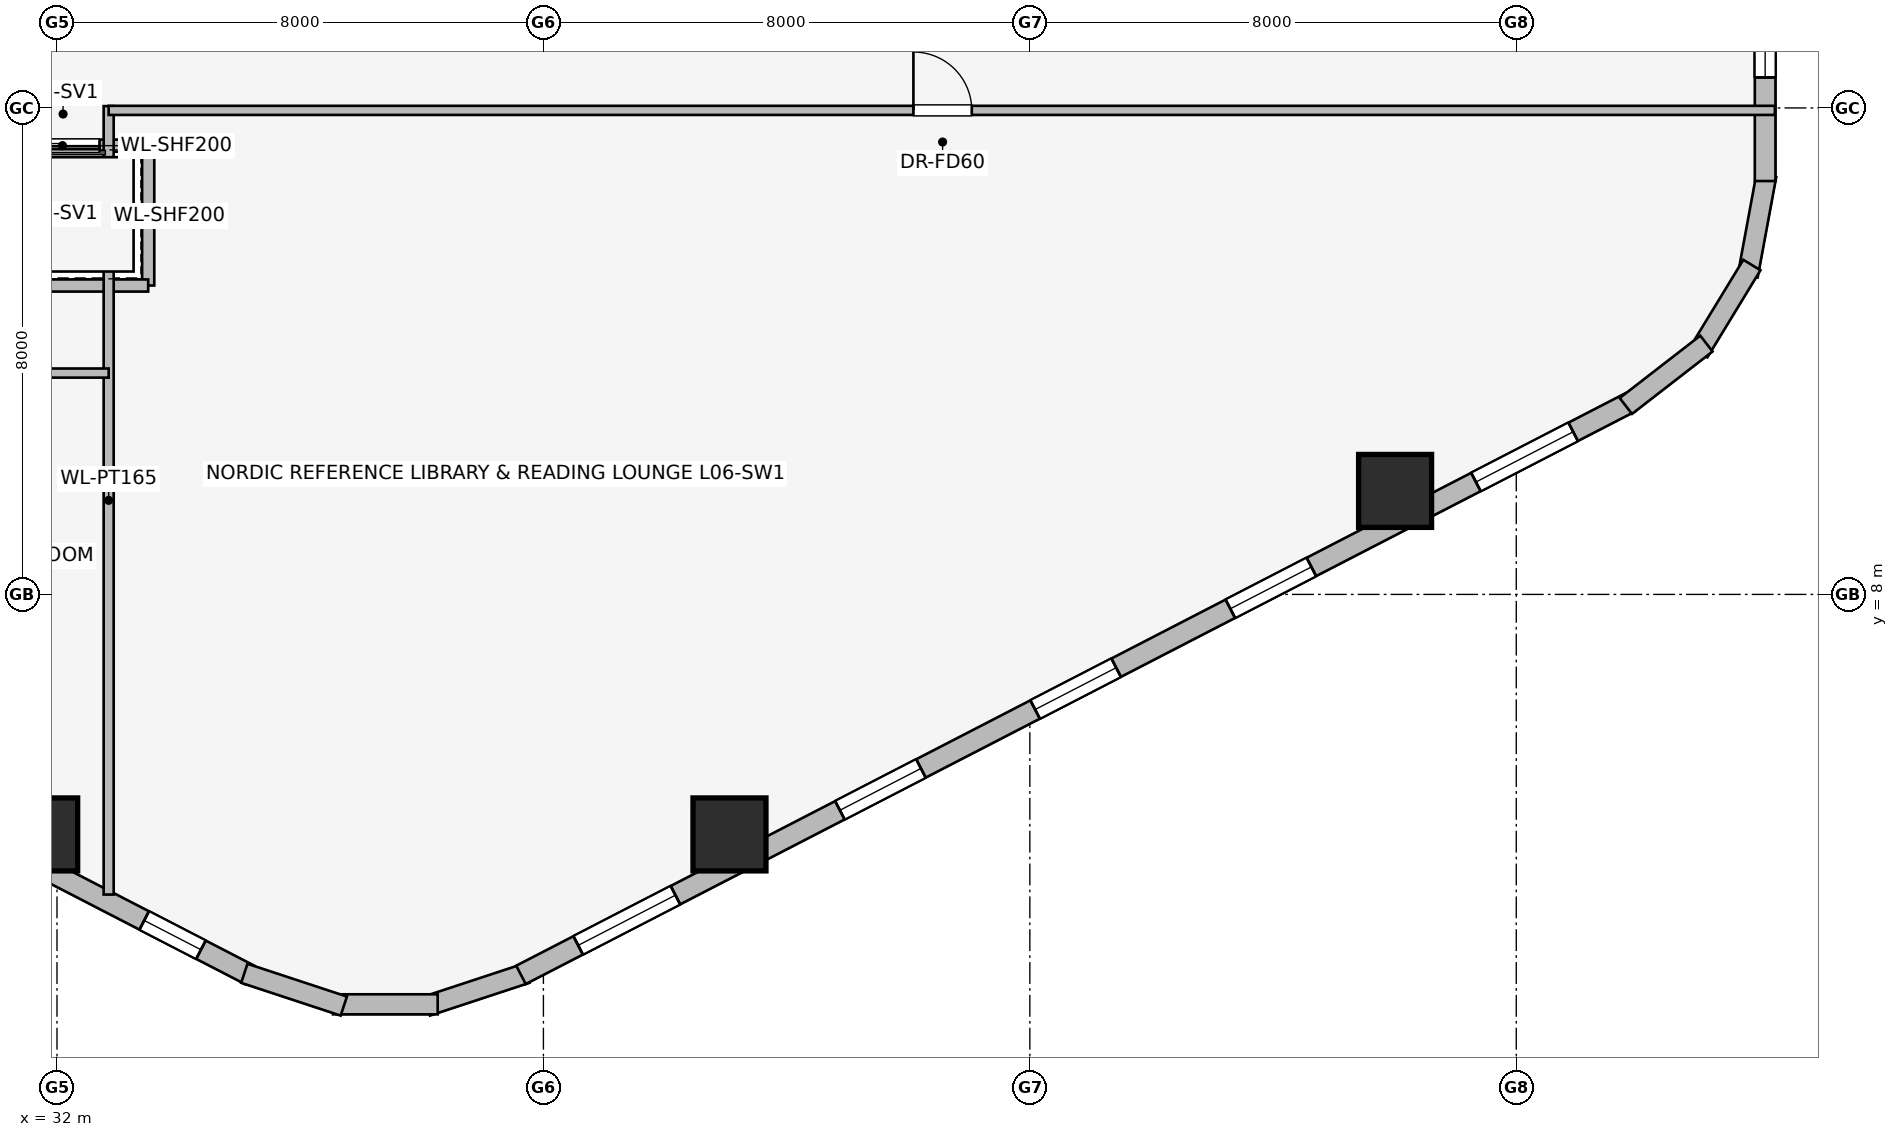
"""IFC4 building model, lengths in metres.
Left out: names, types, materials, properties, quantities, classifications, styles, units other than length and angle.
Written with IfcOpenShell. Run it as: python <this file> out.ifc"""

import sys

from ifc_helpers import new_model, si_unit, direction, frame, frame_2d, origin, origin_2d, place, context, subcontext, project, spatial, rectangle, hollow_rectangle, extrude, element, fill, save


model = new_model("IFC4")
c1 = context("Model", 3, precision=1e-05, world=origin(), true_north=direction((0.0, 1.0)))
c2 = subcontext(c1, "Body", "Model", "MODEL_VIEW")
j1 = project(units=[si_unit("LENGTHUNIT", "METRE"), si_unit("PLANEANGLEUNIT", "RADIAN")], contexts=[c1])
p1 = place(None, origin())
s1 = spatial("IfcSite", under=j1, at=p1, CompositionType="ELEMENT")
p2 = place(p1, origin())
s2 = spatial("IfcBuilding", under=s1, at=p2, CompositionType="ELEMENT")
p3 = place(p2, frame((0.0, 0.0, 21.0)))
s3 = spatial("IfcBuildingStorey", under=s2, at=p3, CompositionType="ELEMENT", Elevation=21.0)
for number, where, z_axis, x_axis in (
    (1, (36.0, 0.9, 5.55), (0.0, 0.0, 1.0), (1.0, 0.0, 0.0)),
    (2, (54.0, 0.9, 5.55), (0.0, 0.0, 1.0), (1.0, 0.0, 0.0)),
):
    element("IfcColumn", number, at=place(p3, frame(where, z_axis=z_axis, x_axis=x_axis)), inside=s3, PredefinedType="USERDEFINED", context=c2, shape_type="SweptSolid", body=[
        extrude(hollow_rectangle(XDim=0.4, YDim=0.4, WallThickness=0.022, at=origin_2d()), origin(), (0.0, 0.0, 1.0), 3.25),
    ])
p4 = place(p2, frame((0.0, 0.0, 27.0)))
s4 = spatial("IfcBuildingStorey", under=s2, at=p4, CompositionType="ELEMENT", Elevation=27.0)
for number, where, z_axis, x_axis in (
    (3, (31.74, 4.053, -0.42), (0.0, 0.0, 1.0), (1.0, 0.0, 0.0)),
    (4, (43.06, 4.053, -0.42), (0.0, 0.0, 1.0), (1.0, 0.0, 0.0)),
    (5, (54.007, 9.702, -0.42), (0.0, 0.0, 1.0), (1.0, 0.0, 0.0)),
):
    element("IfcColumn", number, at=place(p4, frame(where, z_axis=z_axis, x_axis=x_axis)), inside=s4, PredefinedType="COLUMN", context=c2, shape_type="SweptSolid", body=[
        extrude(rectangle(XDim=1.2, YDim=1.2, at=origin_2d()), origin(), (0.0, 0.0, 1.0), 4.07),
    ])
p5 = place(p4, frame((35.169, 1.743, 0.0), z_axis=(0.0, 0.0, 1.0), x_axis=(-0.888634413993, 0.458616264721, 0.0)))
e6 = element("IfcWall", 6, at=p5, inside=s4, PredefinedType="STANDARD", context=c2, shape_type="SweptSolid", body=[
    extrude(rectangle(XDim=20.531, YDim=0.34, at=frame_2d((10.266, 0.0))), origin(), (0.0, 0.0, 1.0), 2.684),
])
p6 = place(p5, frame((0.902, 0.0, 0.75)))
e7 = element("IfcOpeningElement", 7, at=p6, cuts=e6, PredefinedType="OPENING", context=c2, shape_type="SweptSolid", body=[
    extrude(rectangle(XDim=1.05, YDim=1.4, at=frame_2d((0.525, 0.7))), frame((0.0, 0.18, 0.0), z_axis=(0.0, -1.0, 0.0), x_axis=(1.0, 0.0, 0.0)), (0.0, 0.0, 1.0), 0.36),
])
p7 = place(p5, frame((5.903, 0.0, 0.75)))
e8 = element("IfcOpeningElement", 8, at=p7, cuts=e6, PredefinedType="OPENING", context=c2, shape_type="SweptSolid", body=[
    extrude(rectangle(XDim=1.5, YDim=1.5, at=frame_2d((0.75, 0.75))), frame((0.0, 0.18, 0.0), z_axis=(0.0, -1.0, 0.0), x_axis=(1.0, 0.0, 0.0)), (0.0, 0.0, 1.0), 0.36),
])
p8 = place(p5, frame((9.516, 0.0, 0.75)))
e9 = element("IfcOpeningElement", 9, at=p8, cuts=e6, PredefinedType="OPENING", context=c2, shape_type="SweptSolid", body=[
    extrude(rectangle(XDim=1.5, YDim=1.5, at=frame_2d((0.75, 0.75))), frame((0.0, 0.18, 0.0), z_axis=(0.0, -1.0, 0.0), x_axis=(1.0, 0.0, 0.0)), (0.0, 0.0, 1.0), 0.36),
])
p9 = place(p5, frame((13.129, 0.0, 0.75)))
e10 = element("IfcOpeningElement", 10, at=p9, cuts=e6, PredefinedType="OPENING", context=c2, shape_type="SweptSolid", body=[
    extrude(rectangle(XDim=1.5, YDim=1.5, at=frame_2d((0.75, 0.75))), frame((0.0, 0.18, 0.0), z_axis=(0.0, -1.0, 0.0), x_axis=(1.0, 0.0, 0.0)), (0.0, 0.0, 1.0), 0.36),
])
p10 = place(p5, frame((17.673, 0.0, 0.75)))
e11 = element("IfcOpeningElement", 11, at=p10, cuts=e6, PredefinedType="OPENING", context=c2, shape_type="SweptSolid", body=[
    extrude(rectangle(XDim=1.8, YDim=1.5, at=frame_2d((0.9, 0.75))), frame((0.0, 0.18, 0.0), z_axis=(0.0, -1.0, 0.0), x_axis=(1.0, 0.0, 0.0)), (0.0, 0.0, 1.0), 0.36),
])
p11 = place(p4, frame((39.719, 1.769, 0.0), z_axis=(0.0, 0.0, 1.0), x_axis=(-0.94976901097, -0.312951794691, 0.0)))
e12 = element("IfcWall", 12, at=p11, inside=s4, PredefinedType="STANDARD", context=c2, shape_type="SweptSolid", body=[
    extrude(rectangle(XDim=1.722, YDim=0.33, at=frame_2d((0.861, 0.0))), origin(), (0.0, 0.0, 1.0), 3.39),
])
p12 = place(p4, frame((38.261, 1.259, 0.0), z_axis=(0.0, 0.0, 1.0), x_axis=(-1.0, 0.0, 0.0)))
e13 = element("IfcWall", 13, at=p12, inside=s4, PredefinedType="STANDARD", context=c2, shape_type="SweptSolid", body=[
    extrude(rectangle(XDim=1.722, YDim=0.33, at=frame_2d((0.861, 0.0))), origin(), (0.0, 0.0, 1.0), 3.39),
])
p13 = place(p4, frame((36.717, 1.23, 0.0), z_axis=(0.0, 0.0, 1.0), x_axis=(-0.94976901097, 0.312951794691, 0.0)))
e14 = element("IfcWall", 14, at=p13, inside=s4, PredefinedType="STANDARD", context=c2, shape_type="SweptSolid", body=[
    extrude(rectangle(XDim=1.722, YDim=0.33, at=frame_2d((0.861, 0.0))), origin(), (0.0, 0.0, 1.0), 3.39),
])
p14 = place(p4, frame((57.876, 11.159, 0.0), z_axis=(0.0, 0.0, 1.0), x_axis=(-0.888634413993, -0.458616264721, 0.0)))
e15 = element("IfcWall", 15, at=p14, inside=s4, PredefinedType="STANDARD", context=c2, shape_type="SweptSolid", body=[
    extrude(rectangle(XDim=20.531, YDim=0.34, at=frame_2d((10.266, 0.0))), origin(), (0.0, 0.0, 1.0), 2.684),
])
p15 = place(p14, frame((1.058, 0.0, 0.75)))
e16 = element("IfcOpeningElement", 16, at=p15, cuts=e15, PredefinedType="OPENING", context=c2, shape_type="SweptSolid", body=[
    extrude(rectangle(XDim=1.8, YDim=1.5, at=frame_2d((0.9, 0.75))), frame((0.0, 0.18, 0.0), z_axis=(0.0, -1.0, 0.0), x_axis=(1.0, 0.0, 0.0)), (0.0, 0.0, 1.0), 0.36),
])
p16 = place(p14, frame((5.903, 0.0, 0.75)))
e17 = element("IfcOpeningElement", 17, at=p16, cuts=e15, PredefinedType="OPENING", context=c2, shape_type="SweptSolid", body=[
    extrude(rectangle(XDim=1.5, YDim=1.5, at=frame_2d((0.75, 0.75))), frame((0.0, 0.18, 0.0), z_axis=(0.0, -1.0, 0.0), x_axis=(1.0, 0.0, 0.0)), (0.0, 0.0, 1.0), 0.36),
])
p17 = place(p14, frame((9.516, 0.0, 0.75)))
e18 = element("IfcOpeningElement", 18, at=p17, cuts=e15, PredefinedType="OPENING", context=c2, shape_type="SweptSolid", body=[
    extrude(rectangle(XDim=1.5, YDim=1.5, at=frame_2d((0.75, 0.75))), frame((0.0, 0.18, 0.0), z_axis=(0.0, -1.0, 0.0), x_axis=(1.0, 0.0, 0.0)), (0.0, 0.0, 1.0), 0.36),
])
p18 = place(p14, frame((13.129, 0.0, 0.75)))
e19 = element("IfcOpeningElement", 19, at=p18, cuts=e15, PredefinedType="OPENING", context=c2, shape_type="SweptSolid", body=[
    extrude(rectangle(XDim=1.5, YDim=1.5, at=frame_2d((0.75, 0.75))), frame((0.0, 0.18, 0.0), z_axis=(0.0, -1.0, 0.0), x_axis=(1.0, 0.0, 0.0)), (0.0, 0.0, 1.0), 0.36),
])
p19 = place(p14, frame((17.673, 0.0, 0.75)))
e20 = element("IfcOpeningElement", 20, at=p19, cuts=e15, PredefinedType="OPENING", context=c2, shape_type="SweptSolid", body=[
    extrude(rectangle(XDim=1.8, YDim=1.5, at=frame_2d((0.9, 0.75))), frame((0.0, 0.18, 0.0), z_axis=(0.0, -1.0, 0.0), x_axis=(1.0, 0.0, 0.0)), (0.0, 0.0, 1.0), 0.36),
])
p20 = place(p4, frame((60.113, 14.892, 0.0), z_axis=(0.0, 0.0, 1.0), x_axis=(-0.181714143354, -0.983351397063, 0.0)))
e21 = element("IfcWall", 21, at=p20, inside=s4, PredefinedType="STANDARD", context=c2, shape_type="SweptSolid", body=[
    extrude(rectangle(XDim=1.678, YDim=0.33, at=frame_2d((0.839, 0.0))), origin(), (0.0, 0.0, 1.0), 3.39),
])
p21 = place(p4, frame((59.875, 13.417, 0.0), z_axis=(0.0, 0.0, 1.0), x_axis=(-0.520584129191, -0.853810379671, 0.0)))
e22 = element("IfcWall", 22, at=p21, inside=s4, PredefinedType="STANDARD", context=c2, shape_type="SweptSolid", body=[
    extrude(rectangle(XDim=1.677, YDim=0.33, at=frame_2d((0.838, 0.0))), origin(), (0.0, 0.0, 1.0), 3.39),
])
p22 = place(p4, frame((59.127, 12.125, 0.0), z_axis=(0.0, 0.0, 1.0), x_axis=(-0.790691856293, -0.61221433207, 0.0)))
e23 = element("IfcWall", 23, at=p22, inside=s4, PredefinedType="STANDARD", context=c2, shape_type="SweptSolid", body=[
    extrude(rectangle(XDim=1.676, YDim=0.33, at=frame_2d((0.838, 0.0))), origin(), (0.0, 0.0, 1.0), 3.39),
])
p23 = place(p4, frame((60.093, 33.202, 0.0), z_axis=(0.0, 0.0, 1.0), x_axis=(0.0, -1.0, 0.0)))
e24 = element("IfcWall", 24, at=p23, inside=s4, PredefinedType="STANDARD", context=c2, shape_type="SweptSolid", body=[
    extrude(rectangle(XDim=18.404, YDim=0.34, at=frame_2d((9.202, 0.0))), origin(), (0.0, 0.0, 1.0), 2.684),
])
p24 = place(p23, frame((1.744, 0.0, 0.75)))
e25 = element("IfcOpeningElement", 25, at=p24, cuts=e24, PredefinedType="OPENING", context=c2, shape_type="SweptSolid", body=[
    extrude(rectangle(XDim=1.05, YDim=1.4, at=frame_2d((0.525, 0.7))), frame((0.0, 0.18, 0.0), z_axis=(0.0, -1.0, 0.0), x_axis=(1.0, 0.0, 0.0)), (0.0, 0.0, 1.0), 0.36),
])
p25 = place(p23, frame((5.265, 0.0, 0.75)))
e26 = element("IfcOpeningElement", 26, at=p25, cuts=e24, PredefinedType="OPENING", context=c2, shape_type="SweptSolid", body=[
    extrude(rectangle(XDim=1.5, YDim=1.5, at=frame_2d((0.75, 0.75))), frame((0.0, 0.18, 0.0), z_axis=(0.0, -1.0, 0.0), x_axis=(1.0, 0.0, 0.0)), (0.0, 0.0, 1.0), 0.36),
])
p26 = place(p23, frame((8.452, 0.0, 0.75)))
e27 = element("IfcOpeningElement", 27, at=p26, cuts=e24, PredefinedType="OPENING", context=c2, shape_type="SweptSolid", body=[
    extrude(rectangle(XDim=1.5, YDim=1.5, at=frame_2d((0.75, 0.75))), frame((0.0, 0.18, 0.0), z_axis=(0.0, -1.0, 0.0), x_axis=(1.0, 0.0, 0.0)), (0.0, 0.0, 1.0), 0.36),
])
p27 = place(p23, frame((11.639, 0.0, 0.75)))
e28 = element("IfcOpeningElement", 28, at=p27, cuts=e24, PredefinedType="OPENING", context=c2, shape_type="SweptSolid", body=[
    extrude(rectangle(XDim=1.5, YDim=1.5, at=frame_2d((0.75, 0.75))), frame((0.0, 0.18, 0.0), z_axis=(0.0, -1.0, 0.0), x_axis=(1.0, 0.0, 0.0)), (0.0, 0.0, 1.0), 0.36),
])
p28 = place(p23, frame((15.65, 0.0, 0.75)))
e29 = element("IfcOpeningElement", 29, at=p28, cuts=e24, PredefinedType="OPENING", context=c2, shape_type="SweptSolid", body=[
    extrude(rectangle(XDim=1.05, YDim=1.4, at=frame_2d((0.525, 0.7))), frame((0.0, 0.18, 0.0), z_axis=(0.0, -1.0, 0.0), x_axis=(1.0, 0.0, 0.0)), (0.0, 0.0, 1.0), 0.36),
])
p29 = place(p4, frame((33.5, 15.38, 0.0), z_axis=(0.0, 0.0, 1.0), x_axis=(-1.0, 0.0, 0.0)))
e30 = element("IfcWall", 30, at=p29, inside=s4, PredefinedType="PARTITIONING", context=c2, shape_type="SweptSolid", body=[
    extrude(rectangle(XDim=2.82, YDim=0.2, at=frame_2d((1.41, 0.0))), origin(), (0.0, 0.0, 1.0), 3.39),
])
p30 = place(p29, frame((0.8, 0.0, 0.0)))
e31 = element("IfcOpeningElement", 31, at=p30, cuts=e30, PredefinedType="OPENING", context=c2, shape_type="SweptSolid", body=[
    extrude(rectangle(XDim=1.2, YDim=2.2, at=frame_2d((0.6, 1.1))), frame((0.0, 0.11, 0.0), z_axis=(0.0, -1.0, 0.0), x_axis=(1.0, 0.0, 0.0)), (0.0, 0.0, 1.0), 0.22),
])
p31 = place(p4, frame((33.5, 13.08, 0.0), z_axis=(0.0, 0.0, 1.0), x_axis=(0.0, 1.0, 0.0)))
e32 = element("IfcWall", 32, at=p31, inside=s4, PredefinedType="PARTITIONING", context=c2, shape_type="SweptSolid", body=[
    extrude(rectangle(XDim=2.3, YDim=0.2, at=frame_2d((1.15, 0.0))), origin(), (0.0, 0.0, 1.0), 3.39),
])
p32 = place(p4, frame((30.879, 13.08, 0.0), z_axis=(0.0, 0.0, 1.0), x_axis=(1.0, 0.0, 0.0)))
e33 = element("IfcWall", 33, at=p32, inside=s4, PredefinedType="PARTITIONING", context=c2, shape_type="SweptSolid", body=[
    extrude(rectangle(XDim=2.621, YDim=0.2, at=frame_2d((1.311, 0.0))), origin(), (0.0, 0.0, 1.0), 3.39),
])
p33 = place(p4, frame((32.85, 3.064, 0.0), z_axis=(0.0, 0.0, 1.0), x_axis=(0.0, 1.0, 0.0)))
e34 = element("IfcWall", 34, at=p33, inside=s4, PredefinedType="PARTITIONING", context=c2, shape_type="SweptSolid", body=[
    extrude(rectangle(XDim=12.966, YDim=0.165, at=frame_2d((6.483, 0.0))), origin(), (0.0, 0.0, 1.0), 3.39),
])
p34 = place(p4, frame((16.487, 11.64, 0.0), z_axis=(0.0, 0.0, 1.0), x_axis=(1.0, 0.0, 0.0)))
e35 = element("IfcWall", 35, at=p34, inside=s4, PredefinedType="PARTITIONING", context=c2, shape_type="SweptSolid", body=[
    extrude(rectangle(XDim=16.363, YDim=0.15, at=frame_2d((8.182, 0.0))), origin(), (0.0, 0.0, 1.0), 3.39),
])
p35 = place(p34, frame((6.513, 0.0, 0.0)))
e36 = element("IfcOpeningElement", 36, at=p35, cuts=e35, PredefinedType="OPENING", context=c2, shape_type="SweptSolid", body=[
    extrude(rectangle(XDim=0.9, YDim=2.0, at=frame_2d((0.45, 1.0))), frame((0.0, 0.085, 0.0), z_axis=(0.0, -1.0, 0.0), x_axis=(1.0, 0.0, 0.0)), (0.0, 0.0, 1.0), 0.17),
])
p36 = place(p4, frame((32.85, 15.96, 0.0), z_axis=(0.0, 0.0, 1.0), x_axis=(1.0, 0.0, 0.0)))
e37 = element("IfcWall", 37, at=p36, inside=s4, PredefinedType="PARTITIONING", context=c2, shape_type="SweptSolid", body=[
    extrude(rectangle(XDim=27.403, YDim=0.15, at=frame_2d((13.701, 0.0))), origin(), (0.0, 0.0, 1.0), 3.39),
])
p37 = place(p36, frame((13.235, 0.0, 0.0)))
e38 = element("IfcOpeningElement", 38, at=p37, cuts=e37, PredefinedType="OPENING", context=c2, shape_type="SweptSolid", body=[
    extrude(rectangle(XDim=0.96, YDim=2.0, at=frame_2d((0.48, 1.0))), frame((0.0, 0.085, 0.0), z_axis=(0.0, -1.0, 0.0), x_axis=(1.0, 0.0, 0.0)), (0.0, 0.0, 1.0), 0.17),
])
p38 = place(p6, origin())
e39 = element("IfcWindow", 39, at=p38, inside=s4, PartitioningType="SINGLE_PANEL", PredefinedType="WINDOW", context=c2, shape_type="SweptSolid", body=[
    extrude(rectangle(XDim=1.05, YDim=1.4, at=frame_2d((0.525, 0.7))), frame((0.0, 0.03, 0.0), z_axis=(0.0, -1.0, 0.0), x_axis=(1.0, 0.0, 0.0)), (0.0, 0.0, 1.0), 0.06),
])
fill(e7, e39)
p39 = place(p15, origin())
e40 = element("IfcWindow", 40, at=p39, inside=s4, PartitioningType="SINGLE_PANEL", PredefinedType="WINDOW", context=c2, shape_type="SweptSolid", body=[
    extrude(rectangle(XDim=1.8, YDim=1.5, at=frame_2d((0.9, 0.75))), frame((0.0, 0.03, 0.0), z_axis=(0.0, -1.0, 0.0), x_axis=(1.0, 0.0, 0.0)), (0.0, 0.0, 1.0), 0.06),
])
fill(e16, e40)
p40 = place(p16, origin())
e41 = element("IfcWindow", 41, at=p40, inside=s4, PartitioningType="SINGLE_PANEL", PredefinedType="WINDOW", context=c2, shape_type="SweptSolid", body=[
    extrude(rectangle(XDim=1.5, YDim=1.5, at=frame_2d((0.75, 0.75))), frame((0.0, 0.03, 0.0), z_axis=(0.0, -1.0, 0.0), x_axis=(1.0, 0.0, 0.0)), (0.0, 0.0, 1.0), 0.06),
])
fill(e17, e41)
p41 = place(p17, origin())
e42 = element("IfcWindow", 42, at=p41, inside=s4, PartitioningType="SINGLE_PANEL", PredefinedType="WINDOW", context=c2, shape_type="SweptSolid", body=[
    extrude(rectangle(XDim=1.5, YDim=1.5, at=frame_2d((0.75, 0.75))), frame((0.0, 0.03, 0.0), z_axis=(0.0, -1.0, 0.0), x_axis=(1.0, 0.0, 0.0)), (0.0, 0.0, 1.0), 0.06),
])
fill(e18, e42)
p42 = place(p18, origin())
e43 = element("IfcWindow", 43, at=p42, inside=s4, PartitioningType="SINGLE_PANEL", PredefinedType="WINDOW", context=c2, shape_type="SweptSolid", body=[
    extrude(rectangle(XDim=1.5, YDim=1.5, at=frame_2d((0.75, 0.75))), frame((0.0, 0.03, 0.0), z_axis=(0.0, -1.0, 0.0), x_axis=(1.0, 0.0, 0.0)), (0.0, 0.0, 1.0), 0.06),
])
fill(e19, e43)
p43 = place(p19, origin())
e44 = element("IfcWindow", 44, at=p43, inside=s4, PartitioningType="SINGLE_PANEL", PredefinedType="WINDOW", context=c2, shape_type="SweptSolid", body=[
    extrude(rectangle(XDim=1.8, YDim=1.5, at=frame_2d((0.9, 0.75))), frame((0.0, 0.03, 0.0), z_axis=(0.0, -1.0, 0.0), x_axis=(1.0, 0.0, 0.0)), (0.0, 0.0, 1.0), 0.06),
])
fill(e20, e44)
p44 = place(p28, origin())
e45 = element("IfcWindow", 45, at=p44, inside=s4, PartitioningType="SINGLE_PANEL", PredefinedType="WINDOW", context=c2, shape_type="SweptSolid", body=[
    extrude(rectangle(XDim=1.05, YDim=1.4, at=frame_2d((0.525, 0.7))), frame((0.0, 0.03, 0.0), z_axis=(0.0, -1.0, 0.0), x_axis=(1.0, 0.0, 0.0)), (0.0, 0.0, 1.0), 0.06),
])
fill(e29, e45)
p45 = place(p30, origin())
e46 = element("IfcDoor", 46, at=p45, inside=s4, OperationType="SLIDING_TO_RIGHT", PredefinedType="DOOR", context=c2, shape_type="SweptSolid", body=[
    extrude(rectangle(XDim=1.2, YDim=2.2, at=frame_2d((0.6, 1.1))), frame((0.0, 0.025, 0.0), z_axis=(0.0, -1.0, 0.0), x_axis=(1.0, 0.0, 0.0)), (0.0, 0.0, 1.0), 0.05),
])
fill(e31, e46)
p46 = place(p37, origin())
e47 = element("IfcDoor", 47, at=p46, inside=s4, OperationType="SINGLE_SWING_LEFT", PredefinedType="DOOR", context=c2, shape_type="SweptSolid", body=[
    extrude(rectangle(XDim=0.96, YDim=2.0, at=frame_2d((0.48, 1.0))), frame((0.0, 0.025, 0.0), z_axis=(0.0, -1.0, 0.0), x_axis=(1.0, 0.0, 0.0)), (0.0, 0.0, 1.0), 0.05),
])
fill(e38, e47)
save(model, sys.argv[1])
